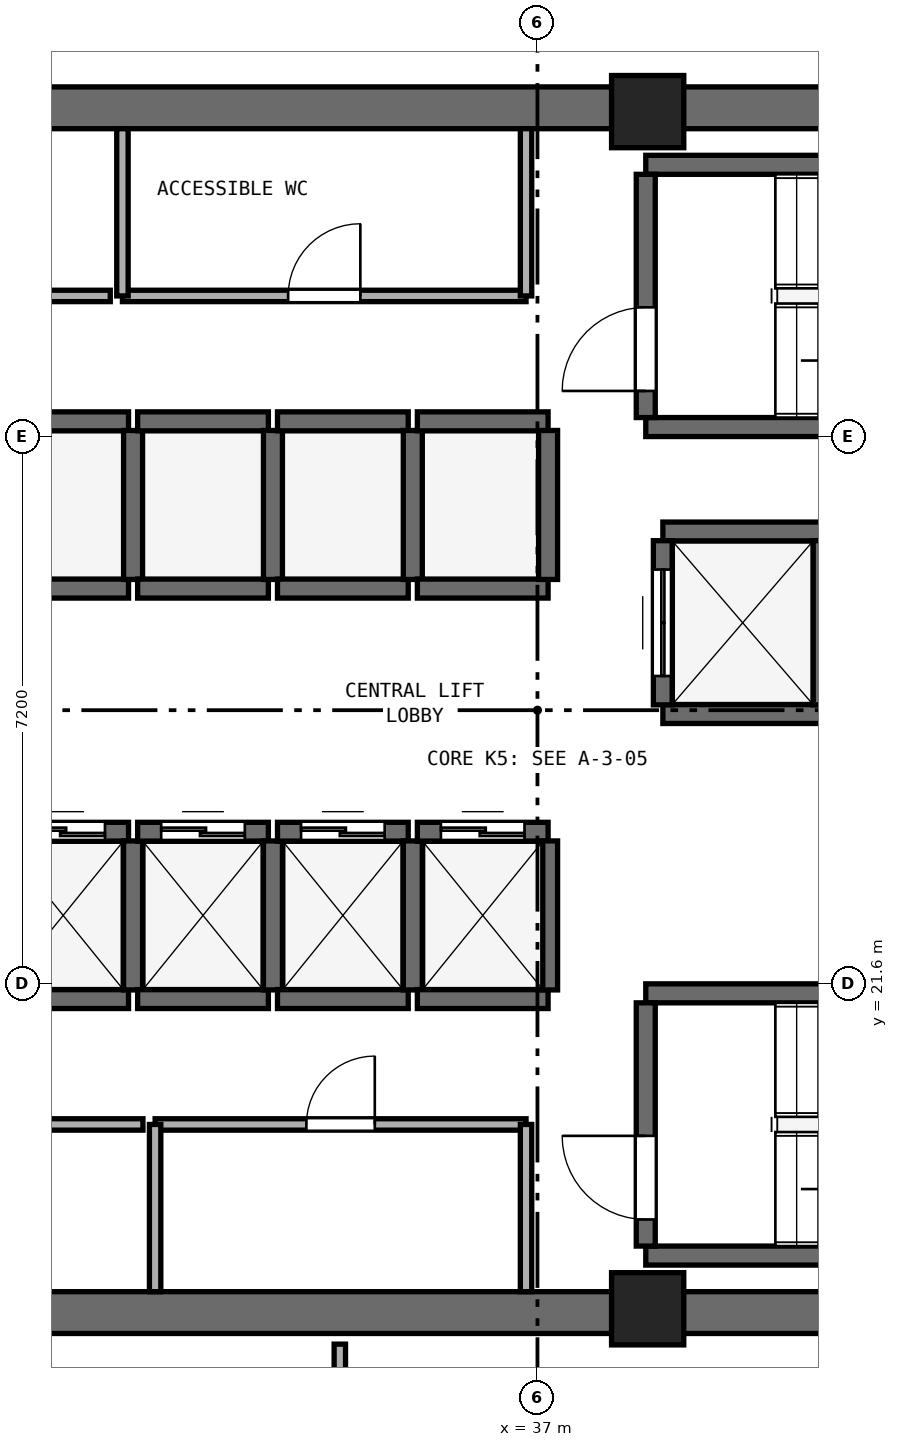
"""IFC4 building model, lengths in metres.
Left out: names, types, materials, properties, quantities, classifications, styles, units other than length and angle.
Written with IfcOpenShell. Run it as: python <this file> out.ifc"""

import sys

from ifc_helpers import new_model, si_unit, direction, frame, frame_2d, origin, origin_2d, place, context, subcontext, project, spatial, rectangle, extrude, element, fill, save


model = new_model("IFC4")
c1 = context("Model", 3, precision=1e-05, world=origin(), true_north=direction((0.0, 1.0)))
c2 = subcontext(c1, "Body", "Model", "MODEL_VIEW")
j1 = project(units=[si_unit("LENGTHUNIT", "METRE"), si_unit("PLANEANGLEUNIT", "RADIAN")], contexts=[c1])
p1 = place(None, origin())
s1 = spatial("IfcSite", under=j1, at=p1, CompositionType="ELEMENT")
p2 = place(p1, origin())
s2 = spatial("IfcBuilding", under=s1, at=p2, CompositionType="ELEMENT")
p3 = place(p2, frame((0.0, 0.0, 155.4)))
s3 = spatial("IfcBuildingStorey", under=s2, at=p3, CompositionType="ELEMENT", Elevation=155.4)
for number, where, z_axis, x_axis in (
    (1, (25.4, 17.275, 0.0), (0.0, 0.0, 1.0), (1.0, 0.0, 0.0)),
    (2, (25.4, 33.125, 0.0), (0.0, 0.0, 1.0), (1.0, 0.0, 0.0)),
):
    element("IfcWall", number, at=place(p3, frame(where, z_axis=z_axis, x_axis=x_axis)), inside=s3, PredefinedType="SHEAR", context=c2, shape_type="SweptSolid", body=[
        extrude(rectangle(XDim=23.2, YDim=0.55, at=frame_2d((11.6, 0.0))), origin(), (0.0, 0.0, 1.0), 3.54),
    ])
for number, where, z_axis, x_axis in (
    (3, (38.45, 17.325, 0.0), (0.0, 0.0, 1.0), (1.0, 0.0, 0.0)),
    (4, (38.45, 33.075, 0.0), (0.0, 0.0, 1.0), (1.0, 0.0, 0.0)),
):
    element("IfcColumn", number, at=place(p3, frame(where, z_axis=z_axis, x_axis=x_axis)), inside=s3, PredefinedType="PILASTER", context=c2, shape_type="SweptSolid", body=[
        extrude(rectangle(XDim=0.95, YDim=0.95, at=origin_2d()), origin(), (0.0, 0.0, 1.0), 3.8),
    ])
for number, where, z_axis, x_axis in (
    (5, (38.425, 28.925, 0.0), (0.0, 0.0, 1.0), (1.0, 0.0, 0.0)),
    (6, (38.425, 32.375, 0.0), (0.0, 0.0, 1.0), (1.0, 0.0, 0.0)),
):
    element("IfcWall", number, at=place(p3, frame(where, z_axis=z_axis, x_axis=x_axis)), inside=s3, PredefinedType="SHEAR", context=c2, shape_type="SweptSolid", body=[
        extrude(rectangle(XDim=7.3, YDim=0.25, at=frame_2d((3.65, 0.0))), origin(), (0.0, 0.0, 1.0), 3.54),
    ])
p4 = place(p3, frame((38.425, 29.05, 0.0), z_axis=(0.0, 0.0, 1.0), x_axis=(0.0, 1.0, 0.0)))
e7 = element("IfcWall", 7, at=p4, inside=s3, PredefinedType="SHEAR", context=c2, shape_type="SweptSolid", body=[
    extrude(rectangle(XDim=3.2, YDim=0.25, at=frame_2d((1.6, 0.0))), origin(), (0.0, 0.0, 1.0), 3.54),
])
p5 = place(p4, frame((0.35, 0.0, 0.0)))
e8 = element("IfcOpeningElement", 8, at=p5, cuts=e7, PredefinedType="OPENING", context=c2, shape_type="SweptSolid", body=[
    extrude(rectangle(XDim=1.1, YDim=2.15, at=frame_2d((0.55, 1.075))), frame((0.0, 0.135, 0.0), z_axis=(0.0, -1.0, 0.0), x_axis=(1.0, 0.0, 0.0)), (0.0, 0.0, 1.0), 0.27),
])
for number, where, z_axis, x_axis in (
    (9, (38.425, 18.025, 0.0), (0.0, 0.0, 1.0), (1.0, 0.0, 0.0)),
    (10, (38.425, 21.475, 0.0), (0.0, 0.0, 1.0), (1.0, 0.0, 0.0)),
):
    element("IfcWall", number, at=place(p3, frame(where, z_axis=z_axis, x_axis=x_axis)), inside=s3, PredefinedType="SHEAR", context=c2, shape_type="SweptSolid", body=[
        extrude(rectangle(XDim=7.3, YDim=0.25, at=frame_2d((3.65, 0.0))), origin(), (0.0, 0.0, 1.0), 3.54),
    ])
p6 = place(p3, frame((38.425, 18.15, 0.0), z_axis=(0.0, 0.0, 1.0), x_axis=(0.0, 1.0, 0.0)))
e11 = element("IfcWall", 11, at=p6, inside=s3, PredefinedType="SHEAR", context=c2, shape_type="SweptSolid", body=[
    extrude(rectangle(XDim=3.2, YDim=0.25, at=frame_2d((1.6, 0.0))), origin(), (0.0, 0.0, 1.0), 3.54),
])
p7 = place(p6, frame((0.35, 0.0, 0.0)))
e12 = element("IfcOpeningElement", 12, at=p7, cuts=e11, PredefinedType="OPENING", context=c2, shape_type="SweptSolid", body=[
    extrude(rectangle(XDim=1.1, YDim=2.15, at=frame_2d((0.55, 1.075))), frame((0.0, 0.135, 0.0), z_axis=(0.0, -1.0, 0.0), x_axis=(1.0, 0.0, 0.0)), (0.0, 0.0, 1.0), 0.27),
])
p8 = place(p3, frame((29.9, 21.4, 0.0), z_axis=(0.0, 0.0, 1.0), x_axis=(1.0, 0.0, 0.0)))
e13 = element("IfcWall", 13, at=p8, inside=s3, PredefinedType="SHEAR", context=c2, shape_type="SweptSolid", body=[
    extrude(rectangle(XDim=1.72, YDim=0.25, at=frame_2d((0.86, 0.0))), origin(), (0.0, 0.0, 1.0), 3.54),
])
p9 = place(p3, frame((29.9, 23.6, 0.0), z_axis=(0.0, 0.0, 1.0), x_axis=(1.0, 0.0, 0.0)))
e14 = element("IfcWall", 14, at=p9, inside=s3, PredefinedType="SHEAR", context=c2, shape_type="SweptSolid", body=[
    extrude(rectangle(XDim=1.72, YDim=0.25, at=frame_2d((0.86, 0.0))), origin(), (0.0, 0.0, 1.0), 3.54),
])
p10 = place(p9, frame((0.31, 0.0, 0.0)))
e15 = element("IfcOpeningElement", 15, at=p10, cuts=e14, PredefinedType="OPENING", context=c2, shape_type="SweptSolid", body=[
    extrude(rectangle(XDim=1.1, YDim=2.15, at=frame_2d((0.55, 1.075))), frame((0.0, 0.135, 0.0), z_axis=(0.0, -1.0, 0.0), x_axis=(1.0, 0.0, 0.0)), (0.0, 0.0, 1.0), 0.27),
])
p11 = place(p3, frame((31.68, 21.52, 0.0), z_axis=(0.0, 0.0, 1.0), x_axis=(0.0, 1.0, 0.0)))
e16 = element("IfcWall", 16, at=p11, inside=s3, PredefinedType="SHEAR", context=c2, shape_type="SweptSolid", body=[
    extrude(rectangle(XDim=1.96, YDim=0.25, at=frame_2d((0.98, 0.0))), origin(), (0.0, 0.0, 1.0), 3.54),
])
p12 = place(p3, frame((31.74, 21.4, 0.0), z_axis=(0.0, 0.0, 1.0), x_axis=(1.0, 0.0, 0.0)))
e17 = element("IfcWall", 17, at=p12, inside=s3, PredefinedType="SHEAR", context=c2, shape_type="SweptSolid", body=[
    extrude(rectangle(XDim=1.72, YDim=0.25, at=frame_2d((0.86, 0.0))), origin(), (0.0, 0.0, 1.0), 3.54),
])
p13 = place(p3, frame((31.74, 23.6, 0.0), z_axis=(0.0, 0.0, 1.0), x_axis=(1.0, 0.0, 0.0)))
e18 = element("IfcWall", 18, at=p13, inside=s3, PredefinedType="SHEAR", context=c2, shape_type="SweptSolid", body=[
    extrude(rectangle(XDim=1.72, YDim=0.25, at=frame_2d((0.86, 0.0))), origin(), (0.0, 0.0, 1.0), 3.54),
])
p14 = place(p13, frame((0.31, 0.0, 0.0)))
e19 = element("IfcOpeningElement", 19, at=p14, cuts=e18, PredefinedType="OPENING", context=c2, shape_type="SweptSolid", body=[
    extrude(rectangle(XDim=1.1, YDim=2.15, at=frame_2d((0.55, 1.075))), frame((0.0, 0.135, 0.0), z_axis=(0.0, -1.0, 0.0), x_axis=(1.0, 0.0, 0.0)), (0.0, 0.0, 1.0), 0.27),
])
p15 = place(p3, frame((33.52, 21.52, 0.0), z_axis=(0.0, 0.0, 1.0), x_axis=(0.0, 1.0, 0.0)))
e20 = element("IfcWall", 20, at=p15, inside=s3, PredefinedType="SHEAR", context=c2, shape_type="SweptSolid", body=[
    extrude(rectangle(XDim=1.96, YDim=0.25, at=frame_2d((0.98, 0.0))), origin(), (0.0, 0.0, 1.0), 3.54),
])
p16 = place(p3, frame((33.58, 21.4, 0.0), z_axis=(0.0, 0.0, 1.0), x_axis=(1.0, 0.0, 0.0)))
e21 = element("IfcWall", 21, at=p16, inside=s3, PredefinedType="SHEAR", context=c2, shape_type="SweptSolid", body=[
    extrude(rectangle(XDim=1.72, YDim=0.25, at=frame_2d((0.86, 0.0))), origin(), (0.0, 0.0, 1.0), 3.54),
])
p17 = place(p3, frame((33.58, 23.6, 0.0), z_axis=(0.0, 0.0, 1.0), x_axis=(1.0, 0.0, 0.0)))
e22 = element("IfcWall", 22, at=p17, inside=s3, PredefinedType="SHEAR", context=c2, shape_type="SweptSolid", body=[
    extrude(rectangle(XDim=1.72, YDim=0.25, at=frame_2d((0.86, 0.0))), origin(), (0.0, 0.0, 1.0), 3.54),
])
p18 = place(p17, frame((0.31, 0.0, 0.0)))
e23 = element("IfcOpeningElement", 23, at=p18, cuts=e22, PredefinedType="OPENING", context=c2, shape_type="SweptSolid", body=[
    extrude(rectangle(XDim=1.1, YDim=2.15, at=frame_2d((0.55, 1.075))), frame((0.0, 0.135, 0.0), z_axis=(0.0, -1.0, 0.0), x_axis=(1.0, 0.0, 0.0)), (0.0, 0.0, 1.0), 0.27),
])
p19 = place(p3, frame((35.36, 21.52, 0.0), z_axis=(0.0, 0.0, 1.0), x_axis=(0.0, 1.0, 0.0)))
e24 = element("IfcWall", 24, at=p19, inside=s3, PredefinedType="SHEAR", context=c2, shape_type="SweptSolid", body=[
    extrude(rectangle(XDim=1.96, YDim=0.25, at=frame_2d((0.98, 0.0))), origin(), (0.0, 0.0, 1.0), 3.54),
])
p20 = place(p3, frame((35.42, 21.4, 0.0), z_axis=(0.0, 0.0, 1.0), x_axis=(1.0, 0.0, 0.0)))
e25 = element("IfcWall", 25, at=p20, inside=s3, PredefinedType="SHEAR", context=c2, shape_type="SweptSolid", body=[
    extrude(rectangle(XDim=1.72, YDim=0.25, at=frame_2d((0.86, 0.0))), origin(), (0.0, 0.0, 1.0), 3.54),
])
p21 = place(p3, frame((35.42, 23.6, 0.0), z_axis=(0.0, 0.0, 1.0), x_axis=(1.0, 0.0, 0.0)))
e26 = element("IfcWall", 26, at=p21, inside=s3, PredefinedType="SHEAR", context=c2, shape_type="SweptSolid", body=[
    extrude(rectangle(XDim=1.72, YDim=0.25, at=frame_2d((0.86, 0.0))), origin(), (0.0, 0.0, 1.0), 3.54),
])
p22 = place(p21, frame((0.31, 0.0, 0.0)))
e27 = element("IfcOpeningElement", 27, at=p22, cuts=e26, PredefinedType="OPENING", context=c2, shape_type="SweptSolid", body=[
    extrude(rectangle(XDim=1.1, YDim=2.15, at=frame_2d((0.55, 1.075))), frame((0.0, 0.135, 0.0), z_axis=(0.0, -1.0, 0.0), x_axis=(1.0, 0.0, 0.0)), (0.0, 0.0, 1.0), 0.27),
])
p23 = place(p3, frame((37.14, 21.52, 0.0), z_axis=(0.0, 0.0, 1.0), x_axis=(0.0, 1.0, 0.0)))
e28 = element("IfcWall", 28, at=p23, inside=s3, PredefinedType="SHEAR", context=c2, shape_type="SweptSolid", body=[
    extrude(rectangle(XDim=1.96, YDim=0.25, at=frame_2d((0.98, 0.0))), origin(), (0.0, 0.0, 1.0), 3.54),
])
for number, where, z_axis, x_axis in (
    (29, (29.9, 26.8, 0.0), (0.0, 0.0, 1.0), (1.0, 0.0, 0.0)),
    (30, (29.9, 29.0, 0.0), (0.0, 0.0, 1.0), (1.0, 0.0, 0.0)),
):
    element("IfcWall", number, at=place(p3, frame(where, z_axis=z_axis, x_axis=x_axis)), inside=s3, PredefinedType="SHEAR", context=c2, shape_type="SweptSolid", body=[
        extrude(rectangle(XDim=1.72, YDim=0.25, at=frame_2d((0.86, 0.0))), origin(), (0.0, 0.0, 1.0), 3.54),
    ])
p24 = place(p3, frame((31.68, 26.92, 0.0), z_axis=(0.0, 0.0, 1.0), x_axis=(0.0, 1.0, 0.0)))
e31 = element("IfcWall", 31, at=p24, inside=s3, PredefinedType="SHEAR", context=c2, shape_type="SweptSolid", body=[
    extrude(rectangle(XDim=1.96, YDim=0.25, at=frame_2d((0.98, 0.0))), origin(), (0.0, 0.0, 1.0), 3.54),
])
for number, where, z_axis, x_axis in (
    (32, (31.74, 26.8, 0.0), (0.0, 0.0, 1.0), (1.0, 0.0, 0.0)),
    (33, (31.74, 29.0, 0.0), (0.0, 0.0, 1.0), (1.0, 0.0, 0.0)),
):
    element("IfcWall", number, at=place(p3, frame(where, z_axis=z_axis, x_axis=x_axis)), inside=s3, PredefinedType="SHEAR", context=c2, shape_type="SweptSolid", body=[
        extrude(rectangle(XDim=1.72, YDim=0.25, at=frame_2d((0.86, 0.0))), origin(), (0.0, 0.0, 1.0), 3.54),
    ])
p25 = place(p3, frame((33.52, 26.92, 0.0), z_axis=(0.0, 0.0, 1.0), x_axis=(0.0, 1.0, 0.0)))
e34 = element("IfcWall", 34, at=p25, inside=s3, PredefinedType="SHEAR", context=c2, shape_type="SweptSolid", body=[
    extrude(rectangle(XDim=1.96, YDim=0.25, at=frame_2d((0.98, 0.0))), origin(), (0.0, 0.0, 1.0), 3.54),
])
for number, where, z_axis, x_axis in (
    (35, (33.58, 26.8, 0.0), (0.0, 0.0, 1.0), (1.0, 0.0, 0.0)),
    (36, (33.58, 29.0, 0.0), (0.0, 0.0, 1.0), (1.0, 0.0, 0.0)),
):
    element("IfcWall", number, at=place(p3, frame(where, z_axis=z_axis, x_axis=x_axis)), inside=s3, PredefinedType="SHEAR", context=c2, shape_type="SweptSolid", body=[
        extrude(rectangle(XDim=1.72, YDim=0.25, at=frame_2d((0.86, 0.0))), origin(), (0.0, 0.0, 1.0), 3.54),
    ])
p26 = place(p3, frame((35.36, 26.92, 0.0), z_axis=(0.0, 0.0, 1.0), x_axis=(0.0, 1.0, 0.0)))
e37 = element("IfcWall", 37, at=p26, inside=s3, PredefinedType="SHEAR", context=c2, shape_type="SweptSolid", body=[
    extrude(rectangle(XDim=1.96, YDim=0.25, at=frame_2d((0.98, 0.0))), origin(), (0.0, 0.0, 1.0), 3.54),
])
for number, where, z_axis, x_axis in (
    (38, (35.42, 26.8, 0.0), (0.0, 0.0, 1.0), (1.0, 0.0, 0.0)),
    (39, (35.42, 29.0, 0.0), (0.0, 0.0, 1.0), (1.0, 0.0, 0.0)),
):
    element("IfcWall", number, at=place(p3, frame(where, z_axis=z_axis, x_axis=x_axis)), inside=s3, PredefinedType="SHEAR", context=c2, shape_type="SweptSolid", body=[
        extrude(rectangle(XDim=1.72, YDim=0.25, at=frame_2d((0.86, 0.0))), origin(), (0.0, 0.0, 1.0), 3.54),
    ])
p27 = place(p3, frame((37.14, 26.92, 0.0), z_axis=(0.0, 0.0, 1.0), x_axis=(0.0, 1.0, 0.0)))
e40 = element("IfcWall", 40, at=p27, inside=s3, PredefinedType="SHEAR", context=c2, shape_type="SweptSolid", body=[
    extrude(rectangle(XDim=1.96, YDim=0.25, at=frame_2d((0.98, 0.0))), origin(), (0.0, 0.0, 1.0), 3.54),
])
for number, where, z_axis, x_axis in (
    (41, (38.65, 25.15, 0.0), (0.0, 0.0, 1.0), (1.0, 0.0, 0.0)),
    (42, (38.65, 27.55, 0.0), (0.0, 0.0, 1.0), (1.0, 0.0, 0.0)),
):
    element("IfcWall", number, at=place(p3, frame(where, z_axis=z_axis, x_axis=x_axis)), inside=s3, PredefinedType="SHEAR", context=c2, shape_type="SweptSolid", body=[
        extrude(rectangle(XDim=2.1, YDim=0.25, at=frame_2d((1.05, 0.0))), origin(), (0.0, 0.0, 1.0), 3.54),
    ])
p28 = place(p3, frame((38.65, 25.27, 0.0), z_axis=(0.0, 0.0, 1.0), x_axis=(0.0, 1.0, 0.0)))
e43 = element("IfcWall", 43, at=p28, inside=s3, PredefinedType="SHEAR", context=c2, shape_type="SweptSolid", body=[
    extrude(rectangle(XDim=2.16, YDim=0.25, at=frame_2d((1.08, 0.0))), origin(), (0.0, 0.0, 1.0), 3.54),
])
p29 = place(p28, frame((0.38, 0.0, 0.0)))
e44 = element("IfcOpeningElement", 44, at=p29, cuts=e43, PredefinedType="OPENING", context=c2, shape_type="SweptSolid", body=[
    extrude(rectangle(XDim=1.4, YDim=2.2, at=frame_2d((0.7, 1.1))), frame((0.0, 0.135, 0.0), z_axis=(0.0, -1.0, 0.0), x_axis=(1.0, 0.0, 0.0)), (0.0, 0.0, 1.0), 0.27),
])
p30 = place(p3, frame((40.75, 25.27, 0.0), z_axis=(0.0, 0.0, 1.0), x_axis=(0.0, 1.0, 0.0)))
e45 = element("IfcWall", 45, at=p30, inside=s3, PredefinedType="SHEAR", context=c2, shape_type="SweptSolid", body=[
    extrude(rectangle(XDim=2.16, YDim=0.25, at=frame_2d((1.08, 0.0))), origin(), (0.0, 0.0, 1.0), 3.54),
])
p31 = place(p3, frame((26.07, 30.65, 0.0), z_axis=(0.0, 0.0, 1.0), x_axis=(1.0, 0.0, 0.0)))
e46 = element("IfcWall", 46, at=p31, inside=s3, PredefinedType="PARTITIONING", context=c2, shape_type="SweptSolid", body=[
    extrude(rectangle(XDim=5.31, YDim=0.15, at=frame_2d((2.655, 0.0))), origin(), (0.0, 0.0, 1.0), 3.54),
])
p32 = place(p31, frame((2.18, 0.0, 0.0)))
e47 = element("IfcOpeningElement", 47, at=p32, cuts=e46, PredefinedType="OPENING", context=c2, shape_type="SweptSolid", body=[
    extrude(rectangle(XDim=0.95, YDim=2.1, at=frame_2d((0.475, 1.05))), frame((0.0, 0.085, 0.0), z_axis=(0.0, -1.0, 0.0), x_axis=(1.0, 0.0, 0.0)), (0.0, 0.0, 1.0), 0.17),
])
p33 = place(p3, frame((31.54, 30.65, 0.0), z_axis=(0.0, 0.0, 1.0), x_axis=(1.0, 0.0, 0.0)))
e48 = element("IfcWall", 48, at=p33, inside=s3, PredefinedType="PARTITIONING", context=c2, shape_type="SweptSolid", body=[
    extrude(rectangle(XDim=5.31, YDim=0.15, at=frame_2d((2.655, 0.0))), origin(), (0.0, 0.0, 1.0), 3.54),
])
p34 = place(p33, frame((2.18, 0.0, 0.0)))
e49 = element("IfcOpeningElement", 49, at=p34, cuts=e48, PredefinedType="OPENING", context=c2, shape_type="SweptSolid", body=[
    extrude(rectangle(XDim=0.95, YDim=2.1, at=frame_2d((0.475, 1.05))), frame((0.0, 0.085, 0.0), z_axis=(0.0, -1.0, 0.0), x_axis=(1.0, 0.0, 0.0)), (0.0, 0.0, 1.0), 0.17),
])
for number, where, z_axis, x_axis in (
    (50, (31.54, 30.65, 0.0), (0.0, 0.0, 1.0), (0.0, 1.0, 0.0)),
    (51, (36.85, 30.65, 0.0), (0.0, 0.0, 1.0), (0.0, 1.0, 0.0)),
):
    element("IfcWall", number, at=place(p3, frame(where, z_axis=z_axis, x_axis=x_axis)), inside=s3, PredefinedType="PARTITIONING", context=c2, shape_type="SweptSolid", body=[
        extrude(rectangle(XDim=2.2, YDim=0.15, at=frame_2d((1.1, 0.0))), origin(), (0.0, 0.0, 1.0), 3.54),
    ])
p35 = place(p3, frame((26.07, 19.75, 0.0), z_axis=(0.0, 0.0, 1.0), x_axis=(1.0, 0.0, 0.0)))
e52 = element("IfcWall", 52, at=p35, inside=s3, PredefinedType="PARTITIONING", context=c2, shape_type="SweptSolid", body=[
    extrude(rectangle(XDim=5.74, YDim=0.15, at=frame_2d((2.87, 0.0))), origin(), (0.0, 0.0, 1.0), 3.54),
])
p36 = place(p35, frame((2.395, 0.0, 0.0)))
e53 = element("IfcOpeningElement", 53, at=p36, cuts=e52, PredefinedType="OPENING", context=c2, shape_type="SweptSolid", body=[
    extrude(rectangle(XDim=0.95, YDim=2.1, at=frame_2d((0.475, 1.05))), frame((0.0, 0.085, 0.0), z_axis=(0.0, -1.0, 0.0), x_axis=(1.0, 0.0, 0.0)), (0.0, 0.0, 1.0), 0.17),
])
p37 = place(p3, frame((31.97, 19.75, 0.0), z_axis=(0.0, 0.0, 1.0), x_axis=(1.0, 0.0, 0.0)))
e54 = element("IfcWall", 54, at=p37, inside=s3, PredefinedType="PARTITIONING", context=c2, shape_type="SweptSolid", body=[
    extrude(rectangle(XDim=4.88, YDim=0.15, at=frame_2d((2.44, 0.0))), origin(), (0.0, 0.0, 1.0), 3.54),
])
p38 = place(p37, frame((1.99, 0.0, 0.0)))
e55 = element("IfcOpeningElement", 55, at=p38, cuts=e54, PredefinedType="OPENING", context=c2, shape_type="SweptSolid", body=[
    extrude(rectangle(XDim=0.9, YDim=2.1, at=frame_2d((0.45, 1.05))), frame((0.0, 0.085, 0.0), z_axis=(0.0, -1.0, 0.0), x_axis=(1.0, 0.0, 0.0)), (0.0, 0.0, 1.0), 0.17),
])
for number, where, z_axis, x_axis in (
    (56, (31.97, 17.55, 0.0), (0.0, 0.0, 1.0), (0.0, 1.0, 0.0)),
    (57, (36.85, 17.55, 0.0), (0.0, 0.0, 1.0), (0.0, 1.0, 0.0)),
):
    element("IfcWall", number, at=place(p3, frame(where, z_axis=z_axis, x_axis=x_axis)), inside=s3, PredefinedType="PARTITIONING", context=c2, shape_type="SweptSolid", body=[
        extrude(rectangle(XDim=2.2, YDim=0.15, at=frame_2d((1.1, 0.0))), origin(), (0.0, 0.0, 1.0), 3.54),
    ])
p39 = place(p3, frame((34.4, 15.35, 0.0), z_axis=(0.0, 0.0, 1.0), x_axis=(0.0, 1.0, 0.0)))
e58 = element("IfcWall", 58, at=p39, inside=s3, PredefinedType="PARTITIONING", context=c2, shape_type="SweptSolid", body=[
    extrude(rectangle(XDim=1.51, YDim=0.15, at=frame_2d((0.755, 0.0))), origin(), (0.0, 0.0, 1.0), 3.54),
])
p40 = place(p5, origin())
e59 = element("IfcDoor", 59, at=p40, inside=s3, OperationType="SINGLE_SWING_LEFT", PredefinedType="DOOR", context=c2, shape_type="SweptSolid", body=[
    extrude(rectangle(XDim=1.1, YDim=2.15, at=frame_2d((0.55, 1.075))), frame((0.0, 0.025, 0.0), z_axis=(0.0, -1.0, 0.0), x_axis=(1.0, 0.0, 0.0)), (0.0, 0.0, 1.0), 0.05),
])
fill(e8, e59)
p41 = place(p7, origin())
e60 = element("IfcDoor", 60, at=p41, inside=s3, OperationType="SINGLE_SWING_RIGHT", PredefinedType="DOOR", context=c2, shape_type="SweptSolid", body=[
    extrude(rectangle(XDim=1.1, YDim=2.15, at=frame_2d((0.55, 1.075))), frame((0.0, 0.025, 0.0), z_axis=(0.0, -1.0, 0.0), x_axis=(1.0, 0.0, 0.0)), (0.0, 0.0, 1.0), 0.05),
])
fill(e12, e60)
p42 = place(p10, origin())
e61 = element("IfcDoor", 61, at=p42, inside=s3, OperationType="DOUBLE_DOOR_SLIDING", PredefinedType="DOOR", context=c2, shape_type="SweptSolid", body=[
    extrude(rectangle(XDim=1.1, YDim=2.15, at=frame_2d((0.55, 1.075))), frame((0.0, 0.025, 0.0), z_axis=(0.0, -1.0, 0.0), x_axis=(1.0, 0.0, 0.0)), (0.0, 0.0, 1.0), 0.05),
])
fill(e15, e61)
p43 = place(p14, origin())
e62 = element("IfcDoor", 62, at=p43, inside=s3, OperationType="DOUBLE_DOOR_SLIDING", PredefinedType="DOOR", context=c2, shape_type="SweptSolid", body=[
    extrude(rectangle(XDim=1.1, YDim=2.15, at=frame_2d((0.55, 1.075))), frame((0.0, 0.025, 0.0), z_axis=(0.0, -1.0, 0.0), x_axis=(1.0, 0.0, 0.0)), (0.0, 0.0, 1.0), 0.05),
])
fill(e19, e62)
p44 = place(p18, origin())
e63 = element("IfcDoor", 63, at=p44, inside=s3, OperationType="DOUBLE_DOOR_SLIDING", PredefinedType="DOOR", context=c2, shape_type="SweptSolid", body=[
    extrude(rectangle(XDim=1.1, YDim=2.15, at=frame_2d((0.55, 1.075))), frame((0.0, 0.025, 0.0), z_axis=(0.0, -1.0, 0.0), x_axis=(1.0, 0.0, 0.0)), (0.0, 0.0, 1.0), 0.05),
])
fill(e23, e63)
p45 = place(p22, origin())
e64 = element("IfcDoor", 64, at=p45, inside=s3, OperationType="DOUBLE_DOOR_SLIDING", PredefinedType="DOOR", context=c2, shape_type="SweptSolid", body=[
    extrude(rectangle(XDim=1.1, YDim=2.15, at=frame_2d((0.55, 1.075))), frame((0.0, 0.025, 0.0), z_axis=(0.0, -1.0, 0.0), x_axis=(1.0, 0.0, 0.0)), (0.0, 0.0, 1.0), 0.05),
])
fill(e27, e64)
p46 = place(p29, origin())
e65 = element("IfcDoor", 65, at=p46, inside=s3, OperationType="DOUBLE_DOOR_SLIDING", PredefinedType="DOOR", context=c2, shape_type="SweptSolid", body=[
    extrude(rectangle(XDim=1.4, YDim=2.2, at=frame_2d((0.7, 1.1))), frame((0.0, 0.025, 0.0), z_axis=(0.0, -1.0, 0.0), x_axis=(1.0, 0.0, 0.0)), (0.0, 0.0, 1.0), 0.05),
])
fill(e44, e65)
p47 = place(p34, origin())
e66 = element("IfcDoor", 66, at=p47, inside=s3, OperationType="SINGLE_SWING_RIGHT", PredefinedType="DOOR", context=c2, shape_type="SweptSolid", body=[
    extrude(rectangle(XDim=0.95, YDim=2.1, at=frame_2d((0.475, 1.05))), frame((0.0, 0.025, 0.0), z_axis=(0.0, -1.0, 0.0), x_axis=(1.0, 0.0, 0.0)), (0.0, 0.0, 1.0), 0.05),
])
fill(e49, e66)
p48 = place(p38, origin())
e67 = element("IfcDoor", 67, at=p48, inside=s3, OperationType="SINGLE_SWING_RIGHT", PredefinedType="DOOR", context=c2, shape_type="SweptSolid", body=[
    extrude(rectangle(XDim=0.9, YDim=2.1, at=frame_2d((0.45, 1.05))), frame((0.0, 0.025, 0.0), z_axis=(0.0, -1.0, 0.0), x_axis=(1.0, 0.0, 0.0)), (0.0, 0.0, 1.0), 0.05),
])
fill(e55, e67)
save(model, sys.argv[1])
